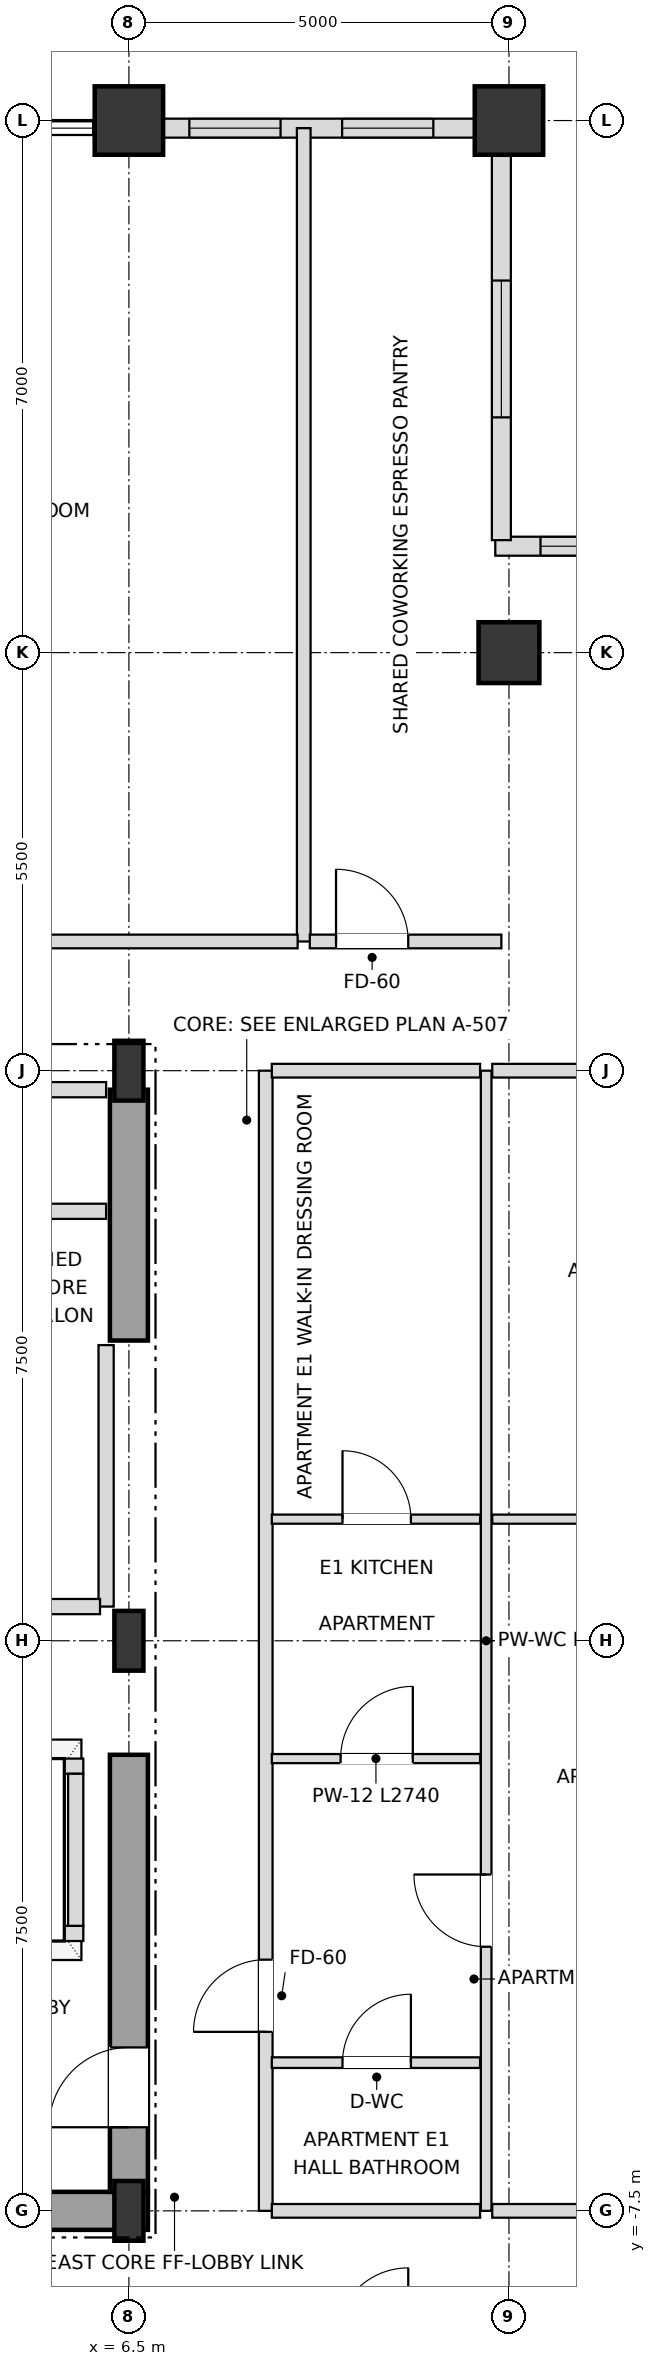
"""IFC4 building model, lengths in metres.
Left out: names, types, materials, properties, quantities, classifications, styles, units other than length and angle.
Written with IfcOpenShell. Run it as: python <this file> out.ifc"""

import sys

from ifc_helpers import new_model, si_unit, direction, frame, frame_2d, origin, origin_2d, place, context, subcontext, project, spatial, rectangle, i_section, extrude, element, fill, save


model = new_model("IFC4")
c1 = context("Model", 3, precision=1e-05, world=origin(), true_north=direction((0.0, 1.0)))
c2 = subcontext(c1, "Body", "Model", "MODEL_VIEW")
j1 = project(units=[si_unit("LENGTHUNIT", "METRE"), si_unit("PLANEANGLEUNIT", "RADIAN")], contexts=[c1])
p1 = place(None, origin())
s1 = spatial("IfcSite", under=j1, at=p1, CompositionType="ELEMENT")
p2 = place(p1, origin())
s2 = spatial("IfcBuilding", under=s1, at=p2, CompositionType="ELEMENT")
p3 = place(p2, frame((0.0, 0.0, 290.7)))
s3 = spatial("IfcBuildingStorey", under=s2, at=p3, CompositionType="ELEMENT", Elevation=290.7)
for number, where, z_axis, x_axis in (
    (1, (6.5, -7.5, 0.0), (0.0, 0.0, 1.0), (1.0, 0.0, 0.0)),
    (2, (6.5, 0.0, 0.0), (0.0, 0.0, 1.0), (1.0, 0.0, 0.0)),
    (3, (6.5, 7.5, 0.0), (0.0, 0.0, 1.0), (1.0, 0.0, 0.0)),
):
    element("IfcColumn", number, at=place(p3, frame(where, z_axis=z_axis, x_axis=x_axis)), inside=s3, PredefinedType="COLUMN", context=c2, shape_type="SweptSolid", body=[
        extrude(i_section(OverallWidth=0.382, OverallDepth=0.786, WebThickness=0.02, FlangeThickness=0.033, at=origin_2d()), origin(), (0.0, 0.0, 1.0), 3.6),
    ])
for number, where, z_axis, x_axis in (
    (4, (11.5, 20.0, 0.0), (0.0, 0.0, 1.0), (1.0, 0.0, 0.0)),
    (5, (6.5, 20.0, 0.0), (0.0, 0.0, 1.0), (1.0, 0.0, 0.0)),
):
    element("IfcColumn", number, at=place(p3, frame(where, z_axis=z_axis, x_axis=x_axis)), inside=s3, PredefinedType="USERDEFINED", context=c2, shape_type="SweptSolid", body=[
        extrude(rectangle(XDim=0.9, YDim=0.9, at=origin_2d()), origin(), (0.0, 0.0, 1.0), 3.6),
    ])
p4 = place(p3, frame((11.5, 13.0, 0.0), z_axis=(0.0, 0.0, 1.0), x_axis=(1.0, 0.0, 0.0)))
e6 = element("IfcColumn", 6, at=p4, inside=s3, PredefinedType="COLUMN", context=c2, shape_type="SweptSolid", body=[
    extrude(rectangle(XDim=0.8, YDim=0.8, at=origin_2d()), origin(), (0.0, 0.0, 1.0), 3.6),
])
p5 = place(p3, frame((11.055, 19.9, 0.0), z_axis=(0.0, 0.0, 1.0), x_axis=(-1.0, 0.0, 0.0)))
e7 = element("IfcWall", 7, at=p5, inside=s3, PredefinedType="SOLIDWALL", context=c2, shape_type="SweptSolid", body=[
    extrude(rectangle(XDim=4.11, YDim=0.25, at=frame_2d((2.055, 0.0))), origin(), (0.0, 0.0, 1.0), 2.748),
])
p6 = place(p5, frame((0.55, 0.0, 0.72)))
e8 = element("IfcOpeningElement", 8, at=p6, cuts=e7, PredefinedType="OPENING", context=c2, shape_type="SweptSolid", body=[
    extrude(rectangle(XDim=1.2, YDim=1.68, at=frame_2d((0.6, 0.84))), frame((0.0, 0.135, 0.0), z_axis=(0.0, -1.0, 0.0), x_axis=(1.0, 0.0, 0.0)), (0.0, 0.0, 1.0), 0.27),
])
p7 = place(p5, frame((2.56, 0.0, 0.72)))
e9 = element("IfcOpeningElement", 9, at=p7, cuts=e7, PredefinedType="OPENING", context=c2, shape_type="SweptSolid", body=[
    extrude(rectangle(XDim=1.2, YDim=1.68, at=frame_2d((0.6, 0.84))), frame((0.0, 0.135, 0.0), z_axis=(0.0, -1.0, 0.0), x_axis=(1.0, 0.0, 0.0)), (0.0, 0.0, 1.0), 0.27),
])
p8 = place(p3, frame((16.98, 14.4, 0.0), z_axis=(0.0, 0.0, 1.0), x_axis=(-1.0, 0.0, 0.0)))
e10 = element("IfcWall", 10, at=p8, inside=s3, PredefinedType="SOLIDWALL", context=c2, shape_type="SweptSolid", body=[
    extrude(rectangle(XDim=5.66, YDim=0.25, at=frame_2d((2.83, 0.0))), origin(), (0.0, 0.0, 1.0), 2.748),
])
p9 = place(p8, frame((0.595, 0.0, 0.72)))
e11 = element("IfcOpeningElement", 11, at=p9, cuts=e10, PredefinedType="OPENING", context=c2, shape_type="SweptSolid", body=[
    extrude(rectangle(XDim=1.8, YDim=1.68, at=frame_2d((0.9, 0.84))), frame((0.0, 0.135, 0.0), z_axis=(0.0, -1.0, 0.0), x_axis=(1.0, 0.0, 0.0)), (0.0, 0.0, 1.0), 0.27),
])
p10 = place(p8, frame((3.265, 0.0, 0.72)))
e12 = element("IfcOpeningElement", 12, at=p10, cuts=e10, PredefinedType="OPENING", context=c2, shape_type="SweptSolid", body=[
    extrude(rectangle(XDim=1.8, YDim=1.68, at=frame_2d((0.9, 0.84))), frame((0.0, 0.135, 0.0), z_axis=(0.0, -1.0, 0.0), x_axis=(1.0, 0.0, 0.0)), (0.0, 0.0, 1.0), 0.27),
])
p11 = place(p3, frame((11.4, 14.48, 0.0), z_axis=(0.0, 0.0, 1.0), x_axis=(0.0, 1.0, 0.0)))
e13 = element("IfcWall", 13, at=p11, inside=s3, PredefinedType="SOLIDWALL", context=c2, shape_type="SweptSolid", body=[
    extrude(rectangle(XDim=5.34, YDim=0.25, at=frame_2d((2.67, 0.0))), origin(), (0.0, 0.0, 1.0), 2.748),
])
p12 = place(p11, frame((1.615, 0.0, 0.72)))
e14 = element("IfcOpeningElement", 14, at=p12, cuts=e13, PredefinedType="OPENING", context=c2, shape_type="SweptSolid", body=[
    extrude(rectangle(XDim=1.8, YDim=1.68, at=frame_2d((0.9, 0.84))), frame((0.0, 0.135, 0.0), z_axis=(0.0, -1.0, 0.0), x_axis=(1.0, 0.0, 0.0)), (0.0, 0.0, 1.0), 0.27),
])
p13 = place(p3, frame((0.0, -7.5, 0.0), z_axis=(0.0, 0.0, 1.0), x_axis=(1.0, 0.0, 0.0)))
e15 = element("IfcWall", 15, at=p13, inside=s3, PredefinedType="SHEAR", context=c2, shape_type="SweptSolid", body=[
    extrude(rectangle(XDim=6.75, YDim=0.5, at=frame_2d((3.375, 0.0))), origin(), (0.0, 0.0, 1.0), 3.38),
])
p14 = place(p3, frame((6.5, -7.25, 0.0), z_axis=(0.0, 0.0, 1.0), x_axis=(0.0, 1.0, 0.0)))
e16 = element("IfcWall", 16, at=p14, inside=s3, PredefinedType="SHEAR", context=c2, shape_type="SweptSolid", body=[
    extrude(rectangle(XDim=5.75, YDim=0.5, at=frame_2d((2.875, 0.0))), origin(), (0.0, 0.0, 1.0), 3.38),
])
p15 = place(p14, frame((0.85, 0.0, 0.0)))
e17 = element("IfcOpeningElement", 17, at=p15, cuts=e16, PredefinedType="OPENING", context=c2, shape_type="SweptSolid", body=[
    extrude(rectangle(XDim=1.05, YDim=2.15, at=frame_2d((0.525, 1.075))), frame((0.0, 0.26, 0.0), z_axis=(0.0, -1.0, 0.0), x_axis=(1.0, 0.0, 0.0)), (0.0, 0.0, 1.0), 0.52),
])
p16 = place(p3, frame((6.5, 3.95, 0.0), z_axis=(0.0, 0.0, 1.0), x_axis=(0.0, 1.0, 0.0)))
e18 = element("IfcWall", 18, at=p16, inside=s3, PredefinedType="SHEAR", context=c2, shape_type="SweptSolid", body=[
    extrude(rectangle(XDim=3.3, YDim=0.5, at=frame_2d((1.65, 0.0))), origin(), (0.0, 0.0, 1.0), 3.38),
])
p17 = place(p3, frame((1.8, -3.85, 0.0), z_axis=(0.0, 0.0, 1.0), x_axis=(1.0, 0.0, 0.0)))
e19 = element("IfcWall", 19, at=p17, inside=s3, PredefinedType="SOLIDWALL", context=c2, shape_type="SweptSolid", body=[
    extrude(rectangle(XDim=4.1, YDim=0.2, at=frame_2d((2.05, 0.0))), origin(), (0.0, 0.0, 1.0), 3.38),
])
p18 = place(p17, frame((0.45, 0.0, 0.0)))
e20 = element("IfcOpeningElement", 20, at=p18, cuts=e19, PredefinedType="OPENING", context=c2, shape_type="SweptSolid", body=[
    extrude(rectangle(XDim=1.2, YDim=2.2, at=frame_2d((0.6, 1.1))), frame((0.0, 0.11, 0.0), z_axis=(0.0, -1.0, 0.0), x_axis=(1.0, 0.0, 0.0)), (0.0, 0.0, 1.0), 0.22),
])
p19 = place(p17, frame((2.45, 0.0, 0.0)))
e21 = element("IfcOpeningElement", 21, at=p19, cuts=e19, PredefinedType="OPENING", context=c2, shape_type="SweptSolid", body=[
    extrude(rectangle(XDim=1.2, YDim=2.2, at=frame_2d((0.6, 1.1))), frame((0.0, 0.11, 0.0), z_axis=(0.0, -1.0, 0.0), x_axis=(1.0, 0.0, 0.0)), (0.0, 0.0, 1.0), 0.22),
])
p20 = place(p3, frame((1.8, -1.65, 0.0), z_axis=(0.0, 0.0, 1.0), x_axis=(1.0, 0.0, 0.0)))
e22 = element("IfcWall", 22, at=p20, inside=s3, PredefinedType="SOLIDWALL", context=c2, shape_type="SweptSolid", body=[
    extrude(rectangle(XDim=4.1, YDim=0.2, at=frame_2d((2.05, 0.0))), origin(), (0.0, 0.0, 1.0), 3.38),
])
p21 = place(p3, frame((5.8, -3.75, 0.0), z_axis=(0.0, 0.0, 1.0), x_axis=(0.0, 1.0, 0.0)))
e23 = element("IfcWall", 23, at=p21, inside=s3, PredefinedType="SOLIDWALL", context=c2, shape_type="SweptSolid", body=[
    extrude(rectangle(XDim=2.0, YDim=0.2, at=frame_2d((1.0, 0.0))), origin(), (0.0, 0.0, 1.0), 3.38),
])
p22 = place(p3, frame((6.2, 0.45, 0.0), z_axis=(0.0, 0.0, 1.0), x_axis=(0.0, 1.0, 0.0)))
e24 = element("IfcWall", 24, at=p22, inside=s3, PredefinedType="SOLIDWALL", context=c2, shape_type="SweptSolid", body=[
    extrude(rectangle(XDim=3.44, YDim=0.2, at=frame_2d((1.72, 0.0))), origin(), (0.0, 0.0, 1.0), 3.38),
])
p23 = place(p3, frame((8.3, -7.5, 0.0), z_axis=(0.0, 0.0, 1.0), x_axis=(0.0, 1.0, 0.0)))
e25 = element("IfcWall", 25, at=p23, inside=s3, PredefinedType="PARTITIONING", context=c2, shape_type="SweptSolid", body=[
    extrude(rectangle(XDim=15.0, YDim=0.18, at=frame_2d((7.5, 0.0))), origin(), (0.0, 0.0, 1.0), 3.38),
])
p24 = place(p23, frame((2.355, 0.0, 0.0)))
e26 = element("IfcOpeningElement", 26, at=p24, cuts=e25, PredefinedType="OPENING", context=c2, shape_type="SweptSolid", body=[
    extrude(rectangle(XDim=0.95, YDim=2.15, at=frame_2d((0.475, 1.075))), frame((0.0, 0.1, 0.0), z_axis=(0.0, -1.0, 0.0), x_axis=(1.0, 0.0, 0.0)), (0.0, 0.0, 1.0), 0.2),
])
p25 = place(p3, frame((8.8, 9.2, 0.0), z_axis=(0.0, 0.0, 1.0), x_axis=(0.0, 1.0, 0.0)))
e27 = element("IfcWall", 27, at=p25, inside=s3, PredefinedType="PARTITIONING", context=c2, shape_type="SweptSolid", body=[
    extrude(rectangle(XDim=10.7, YDim=0.18, at=frame_2d((5.35, 0.0))), origin(), (0.0, 0.0, 1.0), 2.826),
])
p26 = place(p3, frame((11.2, -7.5, 0.0), z_axis=(0.0, 0.0, 1.0), x_axis=(0.0, 1.0, 0.0)))
e28 = element("IfcWall", 28, at=p26, inside=s3, PredefinedType="PARTITIONING", context=c2, shape_type="SweptSolid", body=[
    extrude(rectangle(XDim=15.0, YDim=0.14, at=frame_2d((7.5, 0.0))), origin(), (0.0, 0.0, 1.0), 3.38),
])
p27 = place(p26, frame((3.475, 0.0, 0.0)))
e29 = element("IfcOpeningElement", 29, at=p27, cuts=e28, PredefinedType="OPENING", context=c2, shape_type="SweptSolid", body=[
    extrude(rectangle(XDim=0.95, YDim=2.1, at=frame_2d((0.475, 1.05))), frame((0.0, 0.08, 0.0), z_axis=(0.0, -1.0, 0.0), x_axis=(1.0, 0.0, 0.0)), (0.0, 0.0, 1.0), 0.16),
])
p28 = place(p3, frame((8.38, -7.5, 0.0), z_axis=(0.0, 0.0, 1.0), x_axis=(1.0, 0.0, 0.0)))
e30 = element("IfcWall", 30, at=p28, inside=s3, PredefinedType="PARTITIONING", context=c2, shape_type="SweptSolid", body=[
    extrude(rectangle(XDim=2.74, YDim=0.18, at=frame_2d((1.37, 0.0))), origin(), (0.0, 0.0, 1.0), 2.826),
])
p29 = place(p3, frame((11.28, -7.5, 0.0), z_axis=(0.0, 0.0, 1.0), x_axis=(1.0, 0.0, 0.0)))
e31 = element("IfcWall", 31, at=p29, inside=s3, PredefinedType="PARTITIONING", context=c2, shape_type="SweptSolid", body=[
    extrude(rectangle(XDim=5.62, YDim=0.18, at=frame_2d((2.81, 0.0))), origin(), (0.0, 0.0, 1.0), 2.826),
])
p30 = place(p3, frame((8.38, -5.55, 0.0), z_axis=(0.0, 0.0, 1.0), x_axis=(1.0, 0.0, 0.0)))
e32 = element("IfcWall", 32, at=p30, inside=s3, PredefinedType="PARTITIONING", context=c2, shape_type="SweptSolid", body=[
    extrude(rectangle(XDim=2.74, YDim=0.14, at=frame_2d((1.37, 0.0))), origin(), (0.0, 0.0, 1.0), 3.38),
])
p31 = place(p30, frame((0.93, 0.0, 0.0)))
e33 = element("IfcOpeningElement", 33, at=p31, cuts=e32, PredefinedType="OPENING", context=c2, shape_type="SweptSolid", body=[
    extrude(rectangle(XDim=0.9, YDim=2.1, at=frame_2d((0.45, 1.05))), frame((0.0, 0.08, 0.0), z_axis=(0.0, -1.0, 0.0), x_axis=(1.0, 0.0, 0.0)), (0.0, 0.0, 1.0), 0.16),
])
p32 = place(p3, frame((8.38, -1.55, 0.0), z_axis=(0.0, 0.0, 1.0), x_axis=(1.0, 0.0, 0.0)))
e34 = element("IfcWall", 34, at=p32, inside=s3, PredefinedType="PARTITIONING", context=c2, shape_type="SweptSolid", body=[
    extrude(rectangle(XDim=2.74, YDim=0.12, at=frame_2d((1.37, 0.0))), origin(), (0.0, 0.0, 1.0), 3.38),
])
p33 = place(p32, frame((0.905, 0.0, 0.0)))
e35 = element("IfcOpeningElement", 35, at=p33, cuts=e34, PredefinedType="OPENING", context=c2, shape_type="SweptSolid", body=[
    extrude(rectangle(XDim=0.95, YDim=2.1, at=frame_2d((0.475, 1.05))), frame((0.0, 0.07, 0.0), z_axis=(0.0, -1.0, 0.0), x_axis=(1.0, 0.0, 0.0)), (0.0, 0.0, 1.0), 0.14),
])
p34 = place(p3, frame((4.13, 0.45, 0.0), z_axis=(0.0, 0.0, 1.0), x_axis=(1.0, 0.0, 0.0)))
e36 = element("IfcWall", 36, at=p34, inside=s3, PredefinedType="SOLIDWALL", context=c2, shape_type="SweptSolid", body=[
    extrude(rectangle(XDim=1.99, YDim=0.2, at=frame_2d((0.995, 0.0))), origin(), (0.0, 0.0, 1.0), 3.38),
])
p35 = place(p3, frame((8.38, 1.6, 0.0), z_axis=(0.0, 0.0, 1.0), x_axis=(1.0, 0.0, 0.0)))
e37 = element("IfcWall", 37, at=p35, inside=s3, PredefinedType="PARTITIONING", context=c2, shape_type="SweptSolid", body=[
    extrude(rectangle(XDim=2.74, YDim=0.12, at=frame_2d((1.37, 0.0))), origin(), (0.0, 0.0, 1.0), 3.38),
])
p36 = place(p35, frame((0.93, 0.0, 0.0)))
e38 = element("IfcOpeningElement", 38, at=p36, cuts=e37, PredefinedType="OPENING", context=c2, shape_type="SweptSolid", body=[
    extrude(rectangle(XDim=0.9, YDim=2.1, at=frame_2d((0.45, 1.05))), frame((0.0, 0.07, 0.0), z_axis=(0.0, -1.0, 0.0), x_axis=(1.0, 0.0, 0.0)), (0.0, 0.0, 1.0), 0.14),
])
p37 = place(p3, frame((11.28, 1.6, 0.0), z_axis=(0.0, 0.0, 1.0), x_axis=(1.0, 0.0, 0.0)))
e39 = element("IfcWall", 39, at=p37, inside=s3, PredefinedType="PARTITIONING", context=c2, shape_type="SweptSolid", body=[
    extrude(rectangle(XDim=5.54, YDim=0.12, at=frame_2d((2.77, 0.0))), origin(), (0.0, 0.0, 1.0), 3.018),
])
p38 = place(p37, frame((2.33, 0.0, 0.0)))
e40 = element("IfcOpeningElement", 40, at=p38, cuts=e39, PredefinedType="OPENING", context=c2, shape_type="SweptSolid", body=[
    extrude(rectangle(XDim=0.9, YDim=2.1, at=frame_2d((0.45, 1.05))), frame((0.0, 0.07, 0.0), z_axis=(0.0, -1.0, 0.0), x_axis=(1.0, 0.0, 0.0)), (0.0, 0.0, 1.0), 0.14),
])
for number, where, z_axis, x_axis in (
    (41, (4.13, 5.65, 0.0), (0.0, 0.0, 1.0), (1.0, 0.0, 0.0)),
    (42, (4.13, 7.25, 0.0), (0.0, 0.0, 1.0), (1.0, 0.0, 0.0)),
):
    element("IfcWall", number, at=place(p3, frame(where, z_axis=z_axis, x_axis=x_axis)), inside=s3, PredefinedType="SOLIDWALL", context=c2, shape_type="SweptSolid", body=[
        extrude(rectangle(XDim=2.07, YDim=0.2, at=frame_2d((1.035, 0.0))), origin(), (0.0, 0.0, 1.0), 3.38),
    ])
p39 = place(p3, frame((8.38, 7.5, 0.0), z_axis=(0.0, 0.0, 1.0), x_axis=(1.0, 0.0, 0.0)))
e43 = element("IfcWall", 43, at=p39, inside=s3, PredefinedType="PARTITIONING", context=c2, shape_type="SweptSolid", body=[
    extrude(rectangle(XDim=2.74, YDim=0.18, at=frame_2d((1.37, 0.0))), origin(), (0.0, 0.0, 1.0), 2.826),
])
p40 = place(p3, frame((11.28, 7.5, 0.0), z_axis=(0.0, 0.0, 1.0), x_axis=(1.0, 0.0, 0.0)))
e44 = element("IfcWall", 44, at=p40, inside=s3, PredefinedType="PARTITIONING", context=c2, shape_type="SweptSolid", body=[
    extrude(rectangle(XDim=5.62, YDim=0.18, at=frame_2d((2.81, 0.0))), origin(), (0.0, 0.0, 1.0), 2.826),
])
p41 = place(p3, frame((-1.07, 9.2, 0.0), z_axis=(0.0, 0.0, 1.0), x_axis=(1.0, 0.0, 0.0)))
e45 = element("IfcWall", 45, at=p41, inside=s3, PredefinedType="PARTITIONING", context=c2, shape_type="SweptSolid", body=[
    extrude(rectangle(XDim=9.79, YDim=0.18, at=frame_2d((4.895, 0.0))), origin(), (0.0, 0.0, 1.0), 2.826),
])
p42 = place(p41, frame((4.435, 0.0, 0.0)))
e46 = element("IfcOpeningElement", 46, at=p42, cuts=e45, PredefinedType="OPENING", context=c2, shape_type="SweptSolid", body=[
    extrude(rectangle(XDim=0.95, YDim=2.15, at=frame_2d((0.475, 1.075))), frame((0.0, 0.1, 0.0), z_axis=(0.0, -1.0, 0.0), x_axis=(1.0, 0.0, 0.0)), (0.0, 0.0, 1.0), 0.2),
])
p43 = place(p3, frame((8.88, 9.2, 0.0), z_axis=(0.0, 0.0, 1.0), x_axis=(1.0, 0.0, 0.0)))
e47 = element("IfcWall", 47, at=p43, inside=s3, PredefinedType="PARTITIONING", context=c2, shape_type="SweptSolid", body=[
    extrude(rectangle(XDim=2.52, YDim=0.18, at=frame_2d((1.26, 0.0))), origin(), (0.0, 0.0, 1.0), 3.38),
])
p44 = place(p43, frame((0.345, 0.0, 0.0)))
e48 = element("IfcOpeningElement", 48, at=p44, cuts=e47, PredefinedType="OPENING", context=c2, shape_type="SweptSolid", body=[
    extrude(rectangle(XDim=0.95, YDim=2.15, at=frame_2d((0.475, 1.075))), frame((0.0, 0.1, 0.0), z_axis=(0.0, -1.0, 0.0), x_axis=(1.0, 0.0, 0.0)), (0.0, 0.0, 1.0), 0.2),
])
p45 = place(p6, origin())
e49 = element("IfcWindow", 49, at=p45, inside=s3, PartitioningType="SINGLE_PANEL", PredefinedType="WINDOW", context=c2, shape_type="SweptSolid", body=[
    extrude(rectangle(XDim=1.2, YDim=1.68, at=frame_2d((0.6, 0.84))), frame((0.0, 0.03, 0.0), z_axis=(0.0, -1.0, 0.0), x_axis=(1.0, 0.0, 0.0)), (0.0, 0.0, 1.0), 0.06),
])
fill(e8, e49)
p46 = place(p7, origin())
e50 = element("IfcWindow", 50, at=p46, inside=s3, PartitioningType="SINGLE_PANEL", PredefinedType="WINDOW", context=c2, shape_type="SweptSolid", body=[
    extrude(rectangle(XDim=1.2, YDim=1.68, at=frame_2d((0.6, 0.84))), frame((0.0, 0.03, 0.0), z_axis=(0.0, -1.0, 0.0), x_axis=(1.0, 0.0, 0.0)), (0.0, 0.0, 1.0), 0.06),
])
fill(e9, e50)
p47 = place(p10, origin())
e51 = element("IfcWindow", 51, at=p47, inside=s3, PartitioningType="SINGLE_PANEL", PredefinedType="WINDOW", context=c2, shape_type="SweptSolid", body=[
    extrude(rectangle(XDim=1.8, YDim=1.68, at=frame_2d((0.9, 0.84))), frame((0.0, 0.03, 0.0), z_axis=(0.0, -1.0, 0.0), x_axis=(1.0, 0.0, 0.0)), (0.0, 0.0, 1.0), 0.06),
])
fill(e12, e51)
p48 = place(p12, origin())
e52 = element("IfcWindow", 52, at=p48, inside=s3, PartitioningType="SINGLE_PANEL", PredefinedType="WINDOW", context=c2, shape_type="SweptSolid", body=[
    extrude(rectangle(XDim=1.8, YDim=1.68, at=frame_2d((0.9, 0.84))), frame((0.0, 0.03, 0.0), z_axis=(0.0, -1.0, 0.0), x_axis=(1.0, 0.0, 0.0)), (0.0, 0.0, 1.0), 0.06),
])
fill(e14, e52)
p49 = place(p15, origin())
e53 = element("IfcDoor", 53, at=p49, inside=s3, OperationType="SINGLE_SWING_LEFT", PredefinedType="DOOR", context=c2, shape_type="SweptSolid", body=[
    extrude(rectangle(XDim=1.05, YDim=2.15, at=frame_2d((0.525, 1.075))), frame((0.0, 0.025, 0.0), z_axis=(0.0, -1.0, 0.0), x_axis=(1.0, 0.0, 0.0)), (0.0, 0.0, 1.0), 0.05),
])
fill(e17, e53)
p50 = place(p44, origin())
e54 = element("IfcDoor", 54, at=p50, inside=s3, OperationType="SINGLE_SWING_LEFT", PredefinedType="DOOR", context=c2, shape_type="SweptSolid", body=[
    extrude(rectangle(XDim=0.95, YDim=2.15, at=frame_2d((0.475, 1.075))), frame((0.0, 0.025, 0.0), z_axis=(0.0, -1.0, 0.0), x_axis=(1.0, 0.0, 0.0)), (0.0, 0.0, 1.0), 0.05),
])
fill(e48, e54)
p51 = place(p31, origin())
e55 = element("IfcDoor", 55, at=p51, inside=s3, OperationType="SINGLE_SWING_RIGHT", PredefinedType="DOOR", context=c2, shape_type="SweptSolid", body=[
    extrude(rectangle(XDim=0.9, YDim=2.1, at=frame_2d((0.45, 1.05))), frame((0.0, 0.025, 0.0), z_axis=(0.0, -1.0, 0.0), x_axis=(1.0, 0.0, 0.0)), (0.0, 0.0, 1.0), 0.05),
])
fill(e33, e55)
p52 = place(p24, origin())
e56 = element("IfcDoor", 56, at=p52, inside=s3, OperationType="SINGLE_SWING_LEFT", PredefinedType="DOOR", context=c2, shape_type="SweptSolid", body=[
    extrude(rectangle(XDim=0.95, YDim=2.15, at=frame_2d((0.475, 1.075))), frame((0.0, 0.025, 0.0), z_axis=(0.0, -1.0, 0.0), x_axis=(1.0, 0.0, 0.0)), (0.0, 0.0, 1.0), 0.05),
])
fill(e26, e56)
p53 = place(p33, origin())
e57 = element("IfcDoor", 57, at=p53, inside=s3, OperationType="SINGLE_SWING_RIGHT", PredefinedType="DOOR", context=c2, shape_type="SweptSolid", body=[
    extrude(rectangle(XDim=0.95, YDim=2.1, at=frame_2d((0.475, 1.05))), frame((0.0, 0.025, 0.0), z_axis=(0.0, -1.0, 0.0), x_axis=(1.0, 0.0, 0.0)), (0.0, 0.0, 1.0), 0.05),
])
fill(e35, e57)
p54 = place(p36, origin())
e58 = element("IfcDoor", 58, at=p54, inside=s3, OperationType="SINGLE_SWING_LEFT", PredefinedType="DOOR", context=c2, shape_type="SweptSolid", body=[
    extrude(rectangle(XDim=0.9, YDim=2.1, at=frame_2d((0.45, 1.05))), frame((0.0, 0.025, 0.0), z_axis=(0.0, -1.0, 0.0), x_axis=(1.0, 0.0, 0.0)), (0.0, 0.0, 1.0), 0.05),
])
fill(e38, e58)
p55 = place(p27, origin())
e59 = element("IfcDoor", 59, at=p55, inside=s3, OperationType="SINGLE_SWING_RIGHT", PredefinedType="DOOR", context=c2, shape_type="SweptSolid", body=[
    extrude(rectangle(XDim=0.95, YDim=2.1, at=frame_2d((0.475, 1.05))), frame((0.0, 0.025, 0.0), z_axis=(0.0, -1.0, 0.0), x_axis=(1.0, 0.0, 0.0)), (0.0, 0.0, 1.0), 0.05),
])
fill(e29, e59)
save(model, sys.argv[1])
